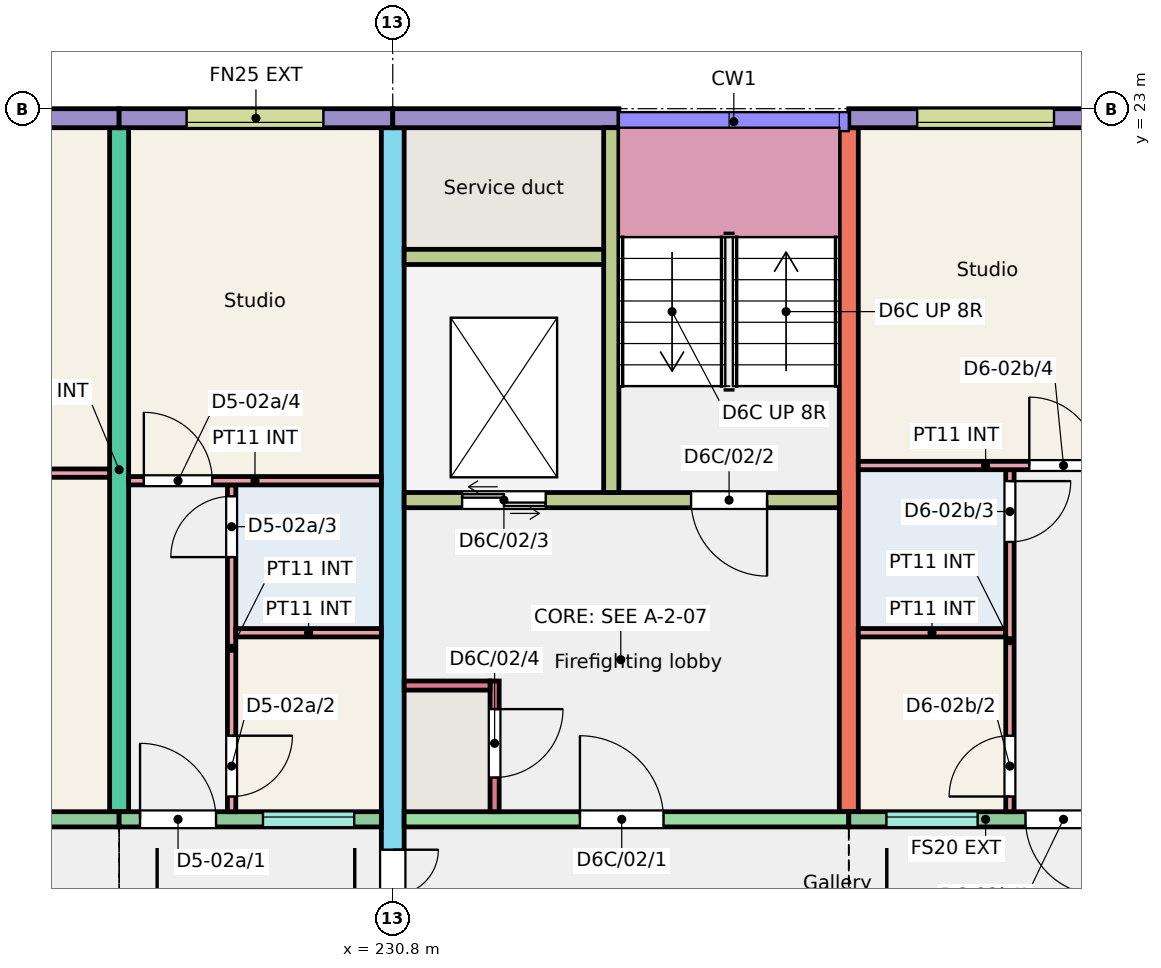
"""IFC4 building model, lengths in metres.
Left out: names, types, materials, properties, quantities, classifications, styles, units other than length and angle.
Written with IfcOpenShell. Run it as: python <this file> out.ifc"""

import sys

from ifc_helpers import new_model, si_unit, direction, frame, frame_2d, origin, place, context, subcontext, project, spatial, rectangle, extrude, element, fill, save


model = new_model("IFC4")
c1 = context("Model", 3, precision=1e-05, world=origin(), true_north=direction((0.0, 1.0)))
c2 = subcontext(c1, "Body", "Model", "MODEL_VIEW")
j1 = project(units=[si_unit("LENGTHUNIT", "METRE"), si_unit("PLANEANGLEUNIT", "RADIAN")], contexts=[c1])
p1 = place(None, origin())
s1 = spatial("IfcSite", under=j1, at=p1, CompositionType="ELEMENT")
p2 = place(p1, origin())
s2 = spatial("IfcBuilding", under=s1, at=p2, CompositionType="ELEMENT")
p3 = place(p2, frame((0.0, 0.0, 6.0)))
s3 = spatial("IfcBuildingStorey", under=s2, at=p3, CompositionType="ELEMENT", Elevation=6.0)
p4 = place(p3, frame((227.2, 13.75, 0.0), z_axis=(0.0, 0.0, 1.0), x_axis=(0.0, 1.0, 0.0)))
e1 = element("IfcWall", 1, at=p4, inside=s3, PredefinedType="SHEAR", context=c2, shape_type="SweptSolid", body=[
    extrude(rectangle(XDim=9.0, YDim=0.25, at=frame_2d((4.5, 0.0))), origin(), (0.0, 0.0, 1.0), 3.0),
])
p5 = place(p3, frame((230.8, 11.75, 0.0), z_axis=(0.0, 0.0, 1.0), x_axis=(0.0, 1.0, 0.0)))
e2 = element("IfcWall", 2, at=p5, inside=s3, PredefinedType="SHEAR", context=c2, shape_type="SweptSolid", body=[
    extrude(rectangle(XDim=11.0, YDim=0.3, at=frame_2d((5.5, 0.0))), origin(), (0.0, 0.0, 1.0), 3.0),
])
p6 = place(p5, frame((0.3, 0.0, 0.0)))
e3 = element("IfcOpeningElement", 3, at=p6, cuts=e2, PredefinedType="OPENING", context=c2, shape_type="SweptSolid", body=[
    extrude(rectangle(XDim=1.2, YDim=2.1, at=frame_2d((0.6, 1.05))), frame((0.0, 0.16, 0.0), z_axis=(0.0, -1.0, 0.0), x_axis=(1.0, 0.0, 0.0)), (0.0, 0.0, 1.0), 0.32),
])
p7 = place(p3, frame((236.8, 13.75, 0.0), z_axis=(0.0, 0.0, 1.0), x_axis=(0.0, 1.0, 0.0)))
e4 = element("IfcWall", 4, at=p7, inside=s3, PredefinedType="SHEAR", context=c2, shape_type="SweptSolid", body=[
    extrude(rectangle(XDim=9.0, YDim=0.25, at=frame_2d((4.5, 0.0))), origin(), (0.0, 0.0, 1.0), 3.0),
])
p8 = place(p3, frame((223.6, 22.875, 0.0), z_axis=(0.0, 0.0, 1.0), x_axis=(1.0, 0.0, 0.0)))
e5 = element("IfcWall", 5, at=p8, inside=s3, PredefinedType="SOLIDWALL", context=c2, shape_type="SweptSolid", body=[
    extrude(rectangle(XDim=3.6, YDim=0.25, at=frame_2d((1.8, 0.0))), origin(), (0.0, 0.0, 1.0), 3.0),
])
p9 = place(p8, frame((0.9, 0.0, 1.1)))
e6 = element("IfcOpeningElement", 6, at=p9, cuts=e5, PredefinedType="OPENING", context=c2, shape_type="SweptSolid", body=[
    extrude(rectangle(XDim=1.8, YDim=1.3, at=frame_2d((0.9, 0.65))), frame((0.0, 0.135, 0.0), z_axis=(0.0, -1.0, 0.0), x_axis=(1.0, 0.0, 0.0)), (0.0, 0.0, 1.0), 0.27),
])
p10 = place(p3, frame((223.6, 13.65, 0.0), z_axis=(0.0, 0.0, 1.0), x_axis=(1.0, 0.0, 0.0)))
e7 = element("IfcWall", 7, at=p10, inside=s3, PredefinedType="SOLIDWALL", context=c2, shape_type="SweptSolid", body=[
    extrude(rectangle(XDim=3.6, YDim=0.2, at=frame_2d((1.8, 0.0))), origin(), (0.0, 0.0, 1.0), 3.0),
])
p11 = place(p10, frame((0.9, 0.0, 1.1)))
e8 = element("IfcOpeningElement", 8, at=p11, cuts=e7, PredefinedType="OPENING", context=c2, shape_type="SweptSolid", body=[
    extrude(rectangle(XDim=1.8, YDim=1.3, at=frame_2d((0.9, 0.65))), frame((0.0, 0.11, 0.0), z_axis=(0.0, -1.0, 0.0), x_axis=(1.0, 0.0, 0.0)), (0.0, 0.0, 1.0), 0.22),
])
p12 = place(p3, frame((227.2, 22.875, 0.0), z_axis=(0.0, 0.0, 1.0), x_axis=(1.0, 0.0, 0.0)))
e9 = element("IfcWall", 9, at=p12, inside=s3, PredefinedType="SOLIDWALL", context=c2, shape_type="SweptSolid", body=[
    extrude(rectangle(XDim=3.6, YDim=0.25, at=frame_2d((1.8, 0.0))), origin(), (0.0, 0.0, 1.0), 3.0),
])
p13 = place(p12, frame((0.887, 0.0, 1.1)))
e10 = element("IfcOpeningElement", 10, at=p13, cuts=e9, PredefinedType="OPENING", context=c2, shape_type="SweptSolid", body=[
    extrude(rectangle(XDim=1.8, YDim=1.3, at=frame_2d((0.9, 0.65))), frame((0.0, 0.135, 0.0), z_axis=(0.0, -1.0, 0.0), x_axis=(1.0, 0.0, 0.0)), (0.0, 0.0, 1.0), 0.27),
])
p14 = place(p3, frame((227.2, 13.65, 0.0), z_axis=(0.0, 0.0, 1.0), x_axis=(1.0, 0.0, 0.0)))
e11 = element("IfcWall", 11, at=p14, inside=s3, PredefinedType="SOLIDWALL", context=c2, shape_type="SweptSolid", body=[
    extrude(rectangle(XDim=3.45, YDim=0.2, at=frame_2d((1.725, 0.0))), origin(), (0.0, 0.0, 1.0), 3.0),
])
p15 = place(p14, frame((1.893, 0.0, 1.1)))
e12 = element("IfcOpeningElement", 12, at=p15, cuts=e11, PredefinedType="OPENING", context=c2, shape_type="SweptSolid", body=[
    extrude(rectangle(XDim=1.2, YDim=1.3, at=frame_2d((0.6, 0.65))), frame((0.0, 0.11, 0.0), z_axis=(0.0, -1.0, 0.0), x_axis=(1.0, 0.0, 0.0)), (0.0, 0.0, 1.0), 0.22),
])
p16 = place(p14, frame((0.275, 0.0, 0.0)))
e13 = element("IfcOpeningElement", 13, at=p16, cuts=e11, PredefinedType="OPENING", context=c2, shape_type="SweptSolid", body=[
    extrude(rectangle(XDim=1.0, YDim=2.1, at=frame_2d((0.5, 1.05))), frame((0.0, 0.11, 0.0), z_axis=(0.0, -1.0, 0.0), x_axis=(1.0, 0.0, 0.0)), (0.0, 0.0, 1.0), 0.22),
])
p17 = place(p3, frame((230.8, 22.875, 0.0), z_axis=(0.0, 0.0, 1.0), x_axis=(1.0, 0.0, 0.0)))
e14 = element("IfcWall", 14, at=p17, inside=s3, PredefinedType="SOLIDWALL", context=c2, shape_type="SweptSolid", body=[
    extrude(rectangle(XDim=2.975, YDim=0.25, at=frame_2d((1.487, 0.0))), origin(), (0.0, 0.0, 1.0), 3.0),
])
p18 = place(p3, frame((230.95, 13.65, 0.0), z_axis=(0.0, 0.0, 1.0), x_axis=(1.0, 0.0, 0.0)))
e15 = element("IfcWall", 15, at=p18, inside=s3, PredefinedType="SHEAR", context=c2, shape_type="SweptSolid", body=[
    extrude(rectangle(XDim=5.85, YDim=0.2, at=frame_2d((2.925, 0.0))), origin(), (0.0, 0.0, 1.0), 3.0),
])
p19 = place(p18, frame((2.312, 0.0, 0.0)))
e16 = element("IfcOpeningElement", 16, at=p19, cuts=e15, PredefinedType="OPENING", context=c2, shape_type="SweptSolid", body=[
    extrude(rectangle(XDim=1.1, YDim=2.1, at=frame_2d((0.55, 1.05))), frame((0.0, 0.11, 0.0), z_axis=(0.0, -1.0, 0.0), x_axis=(1.0, 0.0, 0.0)), (0.0, 0.0, 1.0), 0.22),
])
p20 = place(p3, frame((230.95, 17.85, 0.0), z_axis=(0.0, 0.0, 1.0), x_axis=(1.0, 0.0, 0.0)))
e17 = element("IfcWall", 17, at=p20, inside=s3, PredefinedType="SHEAR", context=c2, shape_type="SweptSolid", body=[
    extrude(rectangle(XDim=5.725, YDim=0.2, at=frame_2d((2.863, 0.0))), origin(), (0.0, 0.0, 1.0), 3.0),
])
p21 = place(p20, frame((3.775, 0.0, 0.0)))
e18 = element("IfcOpeningElement", 18, at=p21, cuts=e17, PredefinedType="OPENING", context=c2, shape_type="SweptSolid", body=[
    extrude(rectangle(XDim=1.0, YDim=2.1, at=frame_2d((0.5, 1.05))), frame((0.0, 0.11, 0.0), z_axis=(0.0, -1.0, 0.0), x_axis=(1.0, 0.0, 0.0)), (0.0, 0.0, 1.0), 0.22),
])
p22 = place(p20, frame((0.762, 0.0, 0.0)))
e19 = element("IfcOpeningElement", 19, at=p22, cuts=e17, PredefinedType="OPENING", context=c2, shape_type="SweptSolid", body=[
    extrude(rectangle(XDim=1.1, YDim=2.1, at=frame_2d((0.55, 1.05))), frame((0.0, 0.11, 0.0), z_axis=(0.0, -1.0, 0.0), x_axis=(1.0, 0.0, 0.0)), (0.0, 0.0, 1.0), 0.22),
])
p23 = place(p3, frame((233.675, 17.95, 0.0), z_axis=(0.0, 0.0, 1.0), x_axis=(0.0, 1.0, 0.0)))
e20 = element("IfcWall", 20, at=p23, inside=s3, PredefinedType="SHEAR", context=c2, shape_type="SweptSolid", body=[
    extrude(rectangle(XDim=4.8, YDim=0.2, at=frame_2d((2.4, 0.0))), origin(), (0.0, 0.0, 1.0), 3.0),
])
p24 = place(p3, frame((230.95, 21.05, 0.0), z_axis=(0.0, 0.0, 1.0), x_axis=(1.0, 0.0, 0.0)))
e21 = element("IfcWall", 21, at=p24, inside=s3, PredefinedType="SHEAR", context=c2, shape_type="SweptSolid", body=[
    extrude(rectangle(XDim=2.625, YDim=0.2, at=frame_2d((1.312, 0.0))), origin(), (0.0, 0.0, 1.0), 3.0),
])
p25 = place(p3, frame((232.14, 13.75, 0.0), z_axis=(0.0, 0.0, 1.0), x_axis=(0.0, 1.0, 0.0)))
e22 = element("IfcWall", 22, at=p25, inside=s3, PredefinedType="SHEAR", context=c2, shape_type="SweptSolid", body=[
    extrude(rectangle(XDim=1.72, YDim=0.12, at=frame_2d((0.86, 0.0))), origin(), (0.0, 0.0, 1.0), 3.0),
])
p26 = place(p25, frame((0.45, 0.0, 0.0)))
e23 = element("IfcOpeningElement", 23, at=p26, cuts=e22, PredefinedType="OPENING", context=c2, shape_type="SweptSolid", body=[
    extrude(rectangle(XDim=0.9, YDim=2.1, at=frame_2d((0.45, 1.05))), frame((0.0, 0.07, 0.0), z_axis=(0.0, -1.0, 0.0), x_axis=(1.0, 0.0, 0.0)), (0.0, 0.0, 1.0), 0.14),
])
p27 = place(p3, frame((230.95, 15.41, 0.0), z_axis=(0.0, 0.0, 1.0), x_axis=(1.0, 0.0, 0.0)))
e24 = element("IfcWall", 24, at=p27, inside=s3, PredefinedType="SHEAR", context=c2, shape_type="SweptSolid", body=[
    extrude(rectangle(XDim=1.13, YDim=0.12, at=frame_2d((0.565, 0.0))), origin(), (0.0, 0.0, 1.0), 3.0),
])
p28 = place(p3, frame((236.8, 22.875, 0.0), z_axis=(0.0, 0.0, 1.0), x_axis=(1.0, 0.0, 0.0)))
e25 = element("IfcWall", 25, at=p28, inside=s3, PredefinedType="SOLIDWALL", context=c2, shape_type="SweptSolid", body=[
    extrude(rectangle(XDim=3.6, YDim=0.25, at=frame_2d((1.8, 0.0))), origin(), (0.0, 0.0, 1.0), 3.0),
])
p29 = place(p28, frame((0.9, 0.0, 1.1)))
e26 = element("IfcOpeningElement", 26, at=p29, cuts=e25, PredefinedType="OPENING", context=c2, shape_type="SweptSolid", body=[
    extrude(rectangle(XDim=1.8, YDim=1.3, at=frame_2d((0.9, 0.65))), frame((0.0, 0.135, 0.0), z_axis=(0.0, -1.0, 0.0), x_axis=(1.0, 0.0, 0.0)), (0.0, 0.0, 1.0), 0.27),
])
p30 = place(p3, frame((236.8, 13.65, 0.0), z_axis=(0.0, 0.0, 1.0), x_axis=(1.0, 0.0, 0.0)))
e27 = element("IfcWall", 27, at=p30, inside=s3, PredefinedType="SOLIDWALL", context=c2, shape_type="SweptSolid", body=[
    extrude(rectangle(XDim=3.6, YDim=0.2, at=frame_2d((1.8, 0.0))), origin(), (0.0, 0.0, 1.0), 3.0),
])
p31 = place(p30, frame((0.495, 0.0, 1.1)))
e28 = element("IfcOpeningElement", 28, at=p31, cuts=e27, PredefinedType="OPENING", context=c2, shape_type="SweptSolid", body=[
    extrude(rectangle(XDim=1.2, YDim=1.3, at=frame_2d((0.6, 0.65))), frame((0.0, 0.11, 0.0), z_axis=(0.0, -1.0, 0.0), x_axis=(1.0, 0.0, 0.0)), (0.0, 0.0, 1.0), 0.22),
])
p32 = place(p30, frame((2.325, 0.0, 0.0)))
e29 = element("IfcOpeningElement", 29, at=p32, cuts=e27, PredefinedType="OPENING", context=c2, shape_type="SweptSolid", body=[
    extrude(rectangle(XDim=1.0, YDim=2.1, at=frame_2d((0.5, 1.05))), frame((0.0, 0.11, 0.0), z_axis=(0.0, -1.0, 0.0), x_axis=(1.0, 0.0, 0.0)), (0.0, 0.0, 1.0), 0.22),
])
p33 = place(p3, frame((228.68, 13.75, 0.0), z_axis=(0.0, 0.0, 1.0), x_axis=(0.0, 1.0, 0.0)))
e30 = element("IfcWall", 30, at=p33, inside=s3, PredefinedType="PARTITIONING", context=c2, shape_type="SweptSolid", body=[
    extrude(rectangle(XDim=4.3, YDim=0.11, at=frame_2d((2.15, 0.0))), origin(), (0.0, 0.0, 1.0), 2.8),
])
p34 = place(p33, frame((0.2, 0.0, 0.0)))
e31 = element("IfcOpeningElement", 31, at=p34, cuts=e30, PredefinedType="OPENING", context=c2, shape_type="SweptSolid", body=[
    extrude(rectangle(XDim=0.8, YDim=2.1, at=frame_2d((0.4, 1.05))), frame((0.0, 0.065, 0.0), z_axis=(0.0, -1.0, 0.0), x_axis=(1.0, 0.0, 0.0)), (0.0, 0.0, 1.0), 0.13),
])
p35 = place(p33, frame((3.35, 0.0, 0.0)))
e32 = element("IfcOpeningElement", 32, at=p35, cuts=e30, PredefinedType="OPENING", context=c2, shape_type="SweptSolid", body=[
    extrude(rectangle(XDim=0.8, YDim=2.1, at=frame_2d((0.4, 1.05))), frame((0.0, 0.065, 0.0), z_axis=(0.0, -1.0, 0.0), x_axis=(1.0, 0.0, 0.0)), (0.0, 0.0, 1.0), 0.13),
])
p36 = place(p3, frame((228.735, 16.105, 0.0), z_axis=(0.0, 0.0, 1.0), x_axis=(1.0, 0.0, 0.0)))
e33 = element("IfcWall", 33, at=p36, inside=s3, PredefinedType="PARTITIONING", context=c2, shape_type="SweptSolid", body=[
    extrude(rectangle(XDim=1.915, YDim=0.11, at=frame_2d((0.958, 0.0))), origin(), (0.0, 0.0, 1.0), 2.8),
])
p37 = place(p3, frame((227.325, 18.105, 0.0), z_axis=(0.0, 0.0, 1.0), x_axis=(1.0, 0.0, 0.0)))
e34 = element("IfcWall", 34, at=p37, inside=s3, PredefinedType="PARTITIONING", context=c2, shape_type="SweptSolid", body=[
    extrude(rectangle(XDim=3.325, YDim=0.11, at=frame_2d((1.663, 0.0))), origin(), (0.0, 0.0, 1.0), 2.8),
])
p38 = place(p37, frame((0.2, 0.0, 0.0)))
e35 = element("IfcOpeningElement", 35, at=p38, cuts=e34, PredefinedType="OPENING", context=c2, shape_type="SweptSolid", body=[
    extrude(rectangle(XDim=0.9, YDim=2.1, at=frame_2d((0.45, 1.05))), frame((0.0, 0.065, 0.0), z_axis=(0.0, -1.0, 0.0), x_axis=(1.0, 0.0, 0.0)), (0.0, 0.0, 1.0), 0.13),
])
p39 = place(p3, frame((223.725, 18.205, 0.0), z_axis=(0.0, 0.0, 1.0), x_axis=(1.0, 0.0, 0.0)))
e36 = element("IfcWall", 36, at=p39, inside=s3, PredefinedType="PARTITIONING", context=c2, shape_type="SweptSolid", body=[
    extrude(rectangle(XDim=3.35, YDim=0.11, at=frame_2d((1.675, 0.0))), origin(), (0.0, 0.0, 1.0), 2.8),
])
p40 = place(p3, frame((236.925, 16.105, 0.0), z_axis=(0.0, 0.0, 1.0), x_axis=(1.0, 0.0, 0.0)))
e37 = element("IfcWall", 37, at=p40, inside=s3, PredefinedType="PARTITIONING", context=c2, shape_type="SweptSolid", body=[
    extrude(rectangle(XDim=1.94, YDim=0.11, at=frame_2d((0.97, 0.0))), origin(), (0.0, 0.0, 1.0), 2.8),
])
p41 = place(p3, frame((238.92, 13.75, 0.0), z_axis=(0.0, 0.0, 1.0), x_axis=(0.0, 1.0, 0.0)))
e38 = element("IfcWall", 38, at=p41, inside=s3, PredefinedType="PARTITIONING", context=c2, shape_type="SweptSolid", body=[
    extrude(rectangle(XDim=4.5, YDim=0.11, at=frame_2d((2.25, 0.0))), origin(), (0.0, 0.0, 1.0), 2.8),
])
p42 = place(p41, frame((0.2, 0.0, 0.0)))
e39 = element("IfcOpeningElement", 39, at=p42, cuts=e38, PredefinedType="OPENING", context=c2, shape_type="SweptSolid", body=[
    extrude(rectangle(XDim=0.8, YDim=2.1, at=frame_2d((0.4, 1.05))), frame((0.0, 0.065, 0.0), z_axis=(0.0, -1.0, 0.0), x_axis=(1.0, 0.0, 0.0)), (0.0, 0.0, 1.0), 0.13),
])
p43 = place(p41, frame((3.55, 0.0, 0.0)))
e40 = element("IfcOpeningElement", 40, at=p43, cuts=e38, PredefinedType="OPENING", context=c2, shape_type="SweptSolid", body=[
    extrude(rectangle(XDim=0.8, YDim=2.1, at=frame_2d((0.4, 1.05))), frame((0.0, 0.065, 0.0), z_axis=(0.0, -1.0, 0.0), x_axis=(1.0, 0.0, 0.0)), (0.0, 0.0, 1.0), 0.13),
])
p44 = place(p3, frame((236.925, 18.305, 0.0), z_axis=(0.0, 0.0, 1.0), x_axis=(1.0, 0.0, 0.0)))
e41 = element("IfcWall", 41, at=p44, inside=s3, PredefinedType="PARTITIONING", context=c2, shape_type="SweptSolid", body=[
    extrude(rectangle(XDim=3.35, YDim=0.11, at=frame_2d((1.675, 0.0))), origin(), (0.0, 0.0, 1.0), 2.8),
])
p45 = place(p44, frame((2.25, 0.0, 0.0)))
e42 = element("IfcOpeningElement", 42, at=p45, cuts=e41, PredefinedType="OPENING", context=c2, shape_type="SweptSolid", body=[
    extrude(rectangle(XDim=0.9, YDim=2.1, at=frame_2d((0.45, 1.05))), frame((0.0, 0.065, 0.0), z_axis=(0.0, -1.0, 0.0), x_axis=(1.0, 0.0, 0.0)), (0.0, 0.0, 1.0), 0.13),
])
p46 = place(p15, origin())
e43 = element("IfcWindow", 43, at=p46, inside=s3, PartitioningType="SINGLE_PANEL", PredefinedType="WINDOW", context=c2, shape_type="SweptSolid", body=[
    extrude(rectangle(XDim=1.2, YDim=1.3, at=frame_2d((0.6, 0.65))), frame((0.0, 0.06, 0.0), z_axis=(0.0, -1.0, 0.0), x_axis=(1.0, 0.0, 0.0)), (0.0, 0.0, 1.0), 0.06),
])
fill(e12, e43)
p47 = place(p13, origin())
e44 = element("IfcWindow", 44, at=p47, inside=s3, PartitioningType="SINGLE_PANEL", PredefinedType="WINDOW", context=c2, shape_type="SweptSolid", body=[
    extrude(rectangle(XDim=1.8, YDim=1.3, at=frame_2d((0.9, 0.65))), frame((0.0, -0.025, 0.0), z_axis=(0.0, -1.0, 0.0), x_axis=(1.0, 0.0, 0.0)), (0.0, 0.0, 1.0), 0.06),
])
fill(e10, e44)
p48 = place(p31, origin())
e45 = element("IfcWindow", 45, at=p48, inside=s3, PartitioningType="SINGLE_PANEL", PredefinedType="WINDOW", context=c2, shape_type="SweptSolid", body=[
    extrude(rectangle(XDim=1.2, YDim=1.3, at=frame_2d((0.6, 0.65))), frame((0.0, 0.06, 0.0), z_axis=(0.0, -1.0, 0.0), x_axis=(1.0, 0.0, 0.0)), (0.0, 0.0, 1.0), 0.06),
])
fill(e28, e45)
p49 = place(p29, origin())
e46 = element("IfcWindow", 46, at=p49, inside=s3, PartitioningType="SINGLE_PANEL", PredefinedType="WINDOW", context=c2, shape_type="SweptSolid", body=[
    extrude(rectangle(XDim=1.8, YDim=1.3, at=frame_2d((0.9, 0.65))), frame((0.0, -0.025, 0.0), z_axis=(0.0, -1.0, 0.0), x_axis=(1.0, 0.0, 0.0)), (0.0, 0.0, 1.0), 0.06),
])
fill(e26, e46)
p50 = place(p16, origin())
e47 = element("IfcDoor", 47, at=p50, inside=s3, OperationType="SINGLE_SWING_LEFT", PredefinedType="DOOR", context=c2, shape_type="SweptSolid", body=[
    extrude(rectangle(XDim=1.0, YDim=2.1, at=frame_2d((0.5, 1.05))), frame((0.0, 0.025, 0.0), z_axis=(0.0, -1.0, 0.0), x_axis=(1.0, 0.0, 0.0)), (0.0, 0.0, 1.0), 0.05),
])
fill(e13, e47)
p51 = place(p34, origin())
e48 = element("IfcDoor", 48, at=p51, inside=s3, OperationType="SINGLE_SWING_RIGHT", PredefinedType="DOOR", context=c2, shape_type="SweptSolid", body=[
    extrude(rectangle(XDim=0.8, YDim=2.1, at=frame_2d((0.4, 1.05))), frame((0.0, 0.025, 0.0), z_axis=(0.0, -1.0, 0.0), x_axis=(1.0, 0.0, 0.0)), (0.0, 0.0, 1.0), 0.05),
])
fill(e31, e48)
p52 = place(p35, origin())
e49 = element("IfcDoor", 49, at=p52, inside=s3, OperationType="SINGLE_SWING_LEFT", PredefinedType="DOOR", context=c2, shape_type="SweptSolid", body=[
    extrude(rectangle(XDim=0.8, YDim=2.1, at=frame_2d((0.4, 1.05))), frame((0.0, 0.025, 0.0), z_axis=(0.0, -1.0, 0.0), x_axis=(1.0, 0.0, 0.0)), (0.0, 0.0, 1.0), 0.05),
])
fill(e32, e49)
p53 = place(p38, origin())
e50 = element("IfcDoor", 50, at=p53, inside=s3, OperationType="SINGLE_SWING_LEFT", PredefinedType="DOOR", context=c2, shape_type="SweptSolid", body=[
    extrude(rectangle(XDim=0.9, YDim=2.1, at=frame_2d((0.45, 1.05))), frame((0.0, 0.025, 0.0), z_axis=(0.0, -1.0, 0.0), x_axis=(1.0, 0.0, 0.0)), (0.0, 0.0, 1.0), 0.05),
])
fill(e35, e50)
p54 = place(p32, origin())
e51 = element("IfcDoor", 51, at=p54, inside=s3, OperationType="SINGLE_SWING_RIGHT", PredefinedType="DOOR", context=c2, shape_type="SweptSolid", body=[
    extrude(rectangle(XDim=1.0, YDim=2.1, at=frame_2d((0.5, 1.05))), frame((0.0, 0.025, 0.0), z_axis=(0.0, -1.0, 0.0), x_axis=(1.0, 0.0, 0.0)), (0.0, 0.0, 1.0), 0.05),
])
fill(e29, e51)
p55 = place(p42, origin())
e52 = element("IfcDoor", 52, at=p55, inside=s3, OperationType="SINGLE_SWING_LEFT", PredefinedType="DOOR", context=c2, shape_type="SweptSolid", body=[
    extrude(rectangle(XDim=0.8, YDim=2.1, at=frame_2d((0.4, 1.05))), frame((0.0, 0.025, 0.0), z_axis=(0.0, -1.0, 0.0), x_axis=(1.0, 0.0, 0.0)), (0.0, 0.0, 1.0), 0.05),
])
fill(e39, e52)
p56 = place(p43, origin())
e53 = element("IfcDoor", 53, at=p56, inside=s3, OperationType="SINGLE_SWING_RIGHT", PredefinedType="DOOR", context=c2, shape_type="SweptSolid", body=[
    extrude(rectangle(XDim=0.8, YDim=2.1, at=frame_2d((0.4, 1.05))), frame((0.0, 0.025, 0.0), z_axis=(0.0, -1.0, 0.0), x_axis=(1.0, 0.0, 0.0)), (0.0, 0.0, 1.0), 0.05),
])
fill(e40, e53)
p57 = place(p45, origin())
e54 = element("IfcDoor", 54, at=p57, inside=s3, OperationType="SINGLE_SWING_LEFT", PredefinedType="DOOR", context=c2, shape_type="SweptSolid", body=[
    extrude(rectangle(XDim=0.9, YDim=2.1, at=frame_2d((0.45, 1.05))), frame((0.0, 0.025, 0.0), z_axis=(0.0, -1.0, 0.0), x_axis=(1.0, 0.0, 0.0)), (0.0, 0.0, 1.0), 0.05),
])
fill(e42, e54)
p58 = place(p19, origin())
e55 = element("IfcDoor", 55, at=p58, inside=s3, OperationType="SINGLE_SWING_LEFT", PredefinedType="DOOR", context=c2, shape_type="SweptSolid", body=[
    extrude(rectangle(XDim=1.1, YDim=2.1, at=frame_2d((0.55, 1.05))), frame((0.0, 0.025, 0.0), z_axis=(0.0, -1.0, 0.0), x_axis=(1.0, 0.0, 0.0)), (0.0, 0.0, 1.0), 0.05),
])
fill(e16, e55)
p59 = place(p21, origin())
e56 = element("IfcDoor", 56, at=p59, inside=s3, OperationType="SINGLE_SWING_RIGHT", PredefinedType="DOOR", context=c2, shape_type="SweptSolid", body=[
    extrude(rectangle(XDim=1.0, YDim=2.1, at=frame_2d((0.5, 1.05))), frame((0.0, 0.025, 0.0), z_axis=(0.0, -1.0, 0.0), x_axis=(1.0, 0.0, 0.0)), (0.0, 0.0, 1.0), 0.05),
])
fill(e18, e56)
p60 = place(p22, origin())
e57 = element("IfcDoor", 57, at=p60, inside=s3, OperationType="DOUBLE_DOOR_SLIDING", PredefinedType="DOOR", context=c2, shape_type="SweptSolid", body=[
    extrude(rectangle(XDim=1.1, YDim=2.1, at=frame_2d((0.55, 1.05))), frame((0.0, 0.025, 0.0), z_axis=(0.0, -1.0, 0.0), x_axis=(1.0, 0.0, 0.0)), (0.0, 0.0, 1.0), 0.05),
])
fill(e19, e57)
p61 = place(p26, origin())
e58 = element("IfcDoor", 58, at=p61, inside=s3, OperationType="SINGLE_SWING_RIGHT", PredefinedType="DOOR", context=c2, shape_type="SweptSolid", body=[
    extrude(rectangle(XDim=0.9, YDim=2.1, at=frame_2d((0.45, 1.05))), frame((0.0, 0.025, 0.0), z_axis=(0.0, -1.0, 0.0), x_axis=(1.0, 0.0, 0.0)), (0.0, 0.0, 1.0), 0.05),
])
fill(e23, e58)
p62 = place(p6, origin())
e59 = element("IfcDoor", 59, at=p62, inside=s3, OperationType="DOUBLE_DOOR_SINGLE_SWING", PredefinedType="DOOR", context=c2, shape_type="SweptSolid", body=[
    extrude(rectangle(XDim=1.2, YDim=2.1, at=frame_2d((0.6, 1.05))), frame((0.0, 0.025, 0.0), z_axis=(0.0, -1.0, 0.0), x_axis=(1.0, 0.0, 0.0)), (0.0, 0.0, 1.0), 0.05),
])
fill(e3, e59)
save(model, sys.argv[1])
